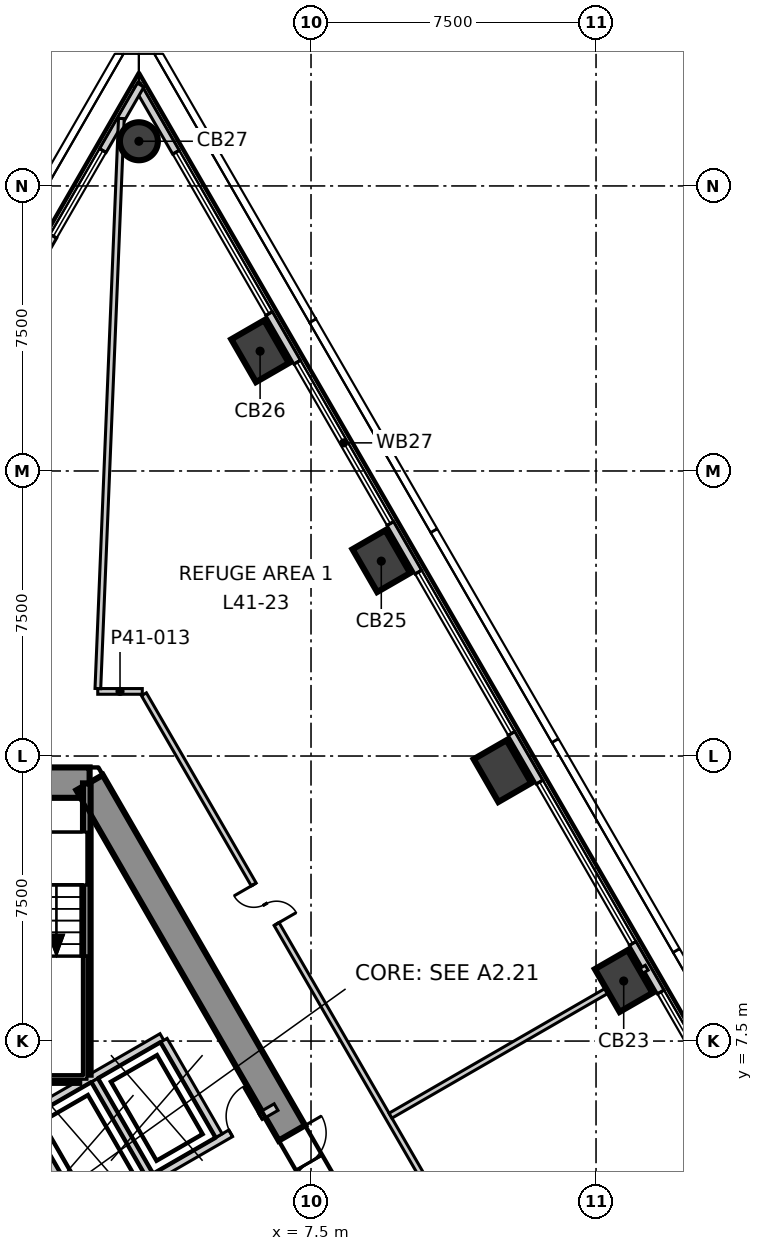
"""IFC4 building model, lengths in metres.
Left out: names, types, materials, properties, quantities, classifications, styles, units other than length and angle.
Written with IfcOpenShell. Run it as: python <this file> out.ifc"""

import sys

from ifc_helpers import new_model, si_unit, direction, frame, frame_2d, origin, origin_2d, place, context, subcontext, project, spatial, polyline, rectangle, circle, outline, extrude, element, fill, save


model = new_model("IFC4")
c1 = context("Model", 3, precision=1e-05, world=origin(), true_north=direction((0.0, 1.0)))
c2 = subcontext(c1, "Body", "Model", "MODEL_VIEW")
j1 = project(units=[si_unit("LENGTHUNIT", "METRE"), si_unit("PLANEANGLEUNIT", "RADIAN")], contexts=[c1])
p1 = place(None, origin())
s1 = spatial("IfcSite", under=j1, at=p1, CompositionType="ELEMENT")
p2 = place(p1, origin())
s2 = spatial("IfcBuilding", under=s1, at=p2, CompositionType="ELEMENT")
p3 = place(p2, frame((0.0, 0.0, 176.3)))
s3 = spatial("IfcBuildingStorey", under=s2, at=p3, CompositionType="ELEMENT", Elevation=176.3)
p4 = place(p3, frame((1.674, 14.3, -0.3), z_axis=(0.0, 0.0, 1.0), x_axis=(-1.0, 0.0, 0.0)))
e1 = element("IfcWall", 1, at=p4, inside=s3, PredefinedType="SHEAR", context=c2, shape_type="SweptSolid", body=[
    extrude(outline(polyline([(-0.231, -0.4), (1.674, -0.4), (3.579, -0.4), (3.117, 0.4), (1.674, 0.4), (0.231, 0.4), (-0.231, -0.4)])), origin(), (0.0, 0.0, 1.0), 4.2),
])
p5 = place(p4, frame((1.437, 0.0, 0.3)))
e2 = element("IfcOpeningElement", 2, at=p5, cuts=e1, PredefinedType="OPENING", context=c2, shape_type="SweptSolid", body=[
    extrude(rectangle(XDim=1.4, YDim=2.1, at=frame_2d((0.7, 1.05))), frame((0.0, 0.41, 0.0), z_axis=(0.0, -1.0, 0.0), x_axis=(1.0, 0.0, 0.0)), (0.0, 0.0, 1.0), 0.82),
])
p6 = place(p3, frame((13.221, -5.7, -0.3), z_axis=(0.0, 0.0, 1.0), x_axis=(-0.499995765644, 0.866027848477, 0.0)))
e3 = element("IfcWall", 3, at=p6, inside=s3, PredefinedType="SHEAR", context=c2, shape_type="SweptSolid", body=[
    extrude(outline(polyline([(-0.231, -0.4), (1.732, -0.4), (3.695, -0.4), (5.658, -0.4), (7.621, -0.4), (9.584, -0.4), (11.547, -0.4), (13.51, -0.4), (15.473, -0.4), (17.436, -0.4), (19.399, -0.4), (21.362, -0.4), (23.325, -0.4), (22.863, 0.4), (20.977, 0.4), (19.091, 0.4), (17.205, 0.4), (15.319, 0.4), (13.433, 0.4), (11.547, 0.4), (9.661, 0.4), (7.775, 0.4), (5.889, 0.4), (4.003, 0.4), (2.117, 0.4), (0.231, 0.4), (-0.231, -0.4)])), origin(), (0.0, 0.0, 1.0), 4.2),
])
p7 = place(p6, frame((10.647, 0.0, 0.3)))
e4 = element("IfcOpeningElement", 4, at=p7, cuts=e3, PredefinedType="OPENING", context=c2, shape_type="SweptSolid", body=[
    extrude(rectangle(XDim=1.8, YDim=2.1, at=frame_2d((0.9, 1.05))), frame((0.0, 0.41, 0.0), z_axis=(0.0, -1.0, 0.0), x_axis=(1.0, 0.0, 0.0)), (0.0, 0.0, 1.0), 0.82),
])
for number, where, z_axis, x_axis in (
    (5, (15.728, 9.08, -0.3), (0.0, 0.0, 1.0), (-0.5, 0.866, 0.0)),
    (6, (12.538, 14.604, -0.3), (0.0, 0.0, 1.0), (-0.5, 0.866, 0.0)),
    (7, (9.349, 20.128, -0.3), (0.0, 0.0, 1.0), (-0.5, 0.866, 0.0)),
    (8, (6.16, 25.652, -0.3), (0.0, 0.0, 1.0), (-0.5, 0.866, 0.0)),
):
    element("IfcColumn", number, at=place(p3, frame(where, z_axis=z_axis, x_axis=x_axis)), inside=s3, PredefinedType="COLUMN", context=c2, shape_type="SweptSolid", body=[
        extrude(rectangle(XDim=1.3, YDim=1.0, at=origin_2d()), origin(), (0.0, 0.0, 1.0), 4.2),
    ])
p8 = place(p3, frame((2.971, 31.176, -0.3), z_axis=(0.0, 0.0, 1.0), x_axis=(-0.5, 0.866025403784, 0.0)))
e9 = element("IfcColumn", 9, at=p8, inside=s3, PredefinedType="COLUMN", context=c2, shape_type="SweptSolid", body=[
    extrude(circle(Radius=0.5, at=origin_2d()), origin(), (0.0, 0.0, 1.0), 4.2),
])
p9 = place(p3, frame((29.742, -13.793, 0.0), z_axis=(0.0, 0.0, 1.0), x_axis=(-0.499994049952, 0.866028839019, 0.0)))
e10 = element("IfcWall", 10, at=p9, inside=s3, PredefinedType="ELEMENTEDWALL", context=c2, shape_type="SweptSolid", body=[
    extrude(rectangle(XDim=53.613, YDim=0.2, at=frame_2d((26.806, 0.0))), origin(), (0.0, 0.0, 1.0), 3.9),
])
p10 = place(p9, frame((2.042, 0.0, 0.9)))
e11 = element("IfcOpeningElement", 11, at=p10, cuts=e10, PredefinedType="OPENING", context=c2, shape_type="SweptSolid", body=[
    extrude(rectangle(XDim=4.9, YDim=2.5, at=frame_2d((2.45, 1.25))), frame((0.0, 0.11, 0.0), z_axis=(0.0, -1.0, 0.0), x_axis=(1.0, 0.0, 0.0)), (0.0, 0.0, 1.0), 0.22),
])
p11 = place(p9, frame((8.42, 0.0, 0.9)))
e12 = element("IfcOpeningElement", 12, at=p11, cuts=e10, PredefinedType="OPENING", context=c2, shape_type="SweptSolid", body=[
    extrude(rectangle(XDim=4.9, YDim=2.5, at=frame_2d((2.45, 1.25))), frame((0.0, 0.11, 0.0), z_axis=(0.0, -1.0, 0.0), x_axis=(1.0, 0.0, 0.0)), (0.0, 0.0, 1.0), 0.22),
])
p12 = place(p9, frame((14.799, 0.0, 0.9)))
e13 = element("IfcOpeningElement", 13, at=p12, cuts=e10, PredefinedType="OPENING", context=c2, shape_type="SweptSolid", body=[
    extrude(rectangle(XDim=4.9, YDim=2.5, at=frame_2d((2.45, 1.25))), frame((0.0, 0.11, 0.0), z_axis=(0.0, -1.0, 0.0), x_axis=(1.0, 0.0, 0.0)), (0.0, 0.0, 1.0), 0.22),
])
p13 = place(p9, frame((21.177, 0.0, 0.9)))
e14 = element("IfcOpeningElement", 14, at=p13, cuts=e10, PredefinedType="OPENING", context=c2, shape_type="SweptSolid", body=[
    extrude(rectangle(XDim=4.9, YDim=2.5, at=frame_2d((2.45, 1.25))), frame((0.0, 0.11, 0.0), z_axis=(0.0, -1.0, 0.0), x_axis=(1.0, 0.0, 0.0)), (0.0, 0.0, 1.0), 0.22),
])
p14 = place(p9, frame((27.555, 0.0, 0.9)))
e15 = element("IfcOpeningElement", 15, at=p14, cuts=e10, PredefinedType="OPENING", context=c2, shape_type="SweptSolid", body=[
    extrude(rectangle(XDim=4.9, YDim=2.5, at=frame_2d((2.45, 1.25))), frame((0.0, 0.11, 0.0), z_axis=(0.0, -1.0, 0.0), x_axis=(1.0, 0.0, 0.0)), (0.0, 0.0, 1.0), 0.22),
])
p15 = place(p9, frame((33.934, 0.0, 0.9)))
e16 = element("IfcOpeningElement", 16, at=p15, cuts=e10, PredefinedType="OPENING", context=c2, shape_type="SweptSolid", body=[
    extrude(rectangle(XDim=4.9, YDim=2.5, at=frame_2d((2.45, 1.25))), frame((0.0, 0.11, 0.0), z_axis=(0.0, -1.0, 0.0), x_axis=(1.0, 0.0, 0.0)), (0.0, 0.0, 1.0), 0.22),
])
p16 = place(p9, frame((40.312, 0.0, 0.9)))
e17 = element("IfcOpeningElement", 17, at=p16, cuts=e10, PredefinedType="OPENING", context=c2, shape_type="SweptSolid", body=[
    extrude(rectangle(XDim=4.9, YDim=2.5, at=frame_2d((2.45, 1.25))), frame((0.0, 0.11, 0.0), z_axis=(0.0, -1.0, 0.0), x_axis=(1.0, 0.0, 0.0)), (0.0, 0.0, 1.0), 0.22),
])
p17 = place(p9, frame((46.691, 0.0, 0.9)))
e18 = element("IfcOpeningElement", 18, at=p17, cuts=e10, PredefinedType="OPENING", context=c2, shape_type="SweptSolid", body=[
    extrude(rectangle(XDim=4.9, YDim=2.5, at=frame_2d((2.45, 1.25))), frame((0.0, 0.11, 0.0), z_axis=(0.0, -1.0, 0.0), x_axis=(1.0, 0.0, 0.0)), (0.0, 0.0, 1.0), 0.22),
])
p18 = place(p3, frame((3.016, 32.654, 0.0), z_axis=(0.0, 0.0, 1.0), x_axis=(-0.499886353396, -0.86609100774, 0.0)))
e19 = element("IfcWall", 19, at=p18, inside=s3, PredefinedType="ELEMENTEDWALL", context=c2, shape_type="SweptSolid", body=[
    extrude(rectangle(XDim=6.104, YDim=0.2, at=frame_2d((3.052, 0.0))), origin(), (0.0, 0.0, 1.0), 3.9),
])
p19 = place(p18, frame((1.99, 0.0, 0.9)))
e20 = element("IfcOpeningElement", 20, at=p19, cuts=e19, PredefinedType="OPENING", context=c2, shape_type="SweptSolid", body=[
    extrude(rectangle(XDim=2.6, YDim=2.5, at=frame_2d((1.3, 1.25))), frame((0.0, 0.11, 0.0), z_axis=(0.0, -1.0, 0.0), x_axis=(1.0, 0.0, 0.0)), (0.0, 0.0, 1.0), 0.22),
])
p20 = place(p3, frame((1.888, 16.7, 0.0), z_axis=(0.0, 0.0, 1.0), x_axis=(1.0, 0.0, 0.0)))
e21 = element("IfcWall", 21, at=p20, inside=s3, PredefinedType="PARTITIONING", context=c2, shape_type="SweptSolid", body=[
    extrude(rectangle(XDim=1.172, YDim=0.15, at=frame_2d((0.586, 0.0))), origin(), (0.0, 0.0, 1.0), 3.9),
])
p21 = place(p3, frame((3.103, 16.625, 0.0), z_axis=(0.0, 0.0, 1.0), x_axis=(0.500016758057, -0.866015728299, 0.0)))
e22 = element("IfcWall", 22, at=p21, inside=s3, PredefinedType="PARTITIONING", context=c2, shape_type="SweptSolid", body=[
    extrude(rectangle(XDim=25.779, YDim=0.15, at=frame_2d((12.889, 0.0))), origin(), (0.0, 0.0, 1.0), 3.9),
])
p22 = place(p21, frame((18.712, 0.0, 0.0)))
e23 = element("IfcOpeningElement", 23, at=p22, cuts=e22, PredefinedType="OPENING", context=c2, shape_type="SweptSolid", body=[
    extrude(rectangle(XDim=1.2, YDim=2.1, at=frame_2d((0.6, 1.05))), frame((0.0, 0.085, 0.0), z_axis=(0.0, -1.0, 0.0), x_axis=(1.0, 0.0, 0.0)), (0.0, 0.0, 1.0), 0.17),
])
p23 = place(p21, frame((5.78, 0.0, 0.0)))
e24 = element("IfcOpeningElement", 24, at=p23, cuts=e22, PredefinedType="OPENING", context=c2, shape_type="SweptSolid", body=[
    extrude(rectangle(XDim=1.2, YDim=2.1, at=frame_2d((0.6, 1.05))), frame((0.0, 0.085, 0.0), z_axis=(0.0, -1.0, 0.0), x_axis=(1.0, 0.0, 0.0)), (0.0, 0.0, 1.0), 0.17),
])
p24 = place(p3, frame((1.891, 16.775, 0.0), z_axis=(0.0, 0.0, 1.0), x_axis=(0.04115975221, 0.999152578337, 0.0)))
e25 = element("IfcWall", 25, at=p24, inside=s3, PredefinedType="PARTITIONING", context=c2, shape_type="SweptSolid", body=[
    extrude(rectangle(XDim=15.013, YDim=0.15, at=frame_2d((7.506, 0.0))), origin(), (0.0, 0.0, 1.0), 3.2),
])
p25 = place(p3, frame((9.591, 5.537, 0.0), z_axis=(0.0, 0.0, 1.0), x_axis=(0.86603676932, 0.499980313799, 0.0)))
e26 = element("IfcWall", 26, at=p25, inside=s3, PredefinedType="PARTITIONING", context=c2, shape_type="SweptSolid", body=[
    extrude(rectangle(XDim=7.786, YDim=0.15, at=frame_2d((3.893, 0.0))), origin(), (0.0, 0.0, 1.0), 3.4),
])
p26 = place(p3, frame((-0.002, 5.542, 0.0), z_axis=(0.0, 0.0, 1.0), x_axis=(0.866103910842, 0.499863997127, 0.0)))
e27 = element("IfcWall", 27, at=p26, inside=s3, PredefinedType="SOLIDWALL", context=c2, shape_type="SweptSolid", body=[
    extrude(rectangle(XDim=4.131, YDim=0.2, at=frame_2d((2.065, 0.0))), origin(), (0.0, 0.0, 1.0), 3.9),
])
p27 = place(p3, frame((0.0, 5.4, 0.0), z_axis=(0.0, 0.0, 1.0), x_axis=(0.500103862429, -0.865965430478, 0.0)))
e28 = element("IfcWall", 28, at=p27, inside=s3, PredefinedType="SOLIDWALL", context=c2, shape_type="SweptSolid", body=[
    extrude(rectangle(XDim=2.973, YDim=0.2, at=frame_2d((1.487, 0.0))), origin(), (0.0, 0.0, 1.0), 3.9),
])
p28 = place(p3, frame((1.577, 2.874, 0.0), z_axis=(0.0, 0.0, 1.0), x_axis=(0.866073694534, 0.499916348638, 0.0)))
e29 = element("IfcWall", 29, at=p28, inside=s3, PredefinedType="SOLIDWALL", context=c2, shape_type="SweptSolid", body=[
    extrude(rectangle(XDim=5.777, YDim=0.2, at=frame_2d((2.888, 0.0))), origin(), (0.0, 0.0, 1.0), 3.9),
])
p29 = place(p28, frame((4.399, 0.0, 0.0)))
e30 = element("IfcOpeningElement", 30, at=p29, cuts=e29, PredefinedType="OPENING", context=c2, shape_type="SweptSolid", body=[
    extrude(rectangle(XDim=0.9, YDim=2.1, at=frame_2d((0.45, 1.05))), frame((0.0, 0.11, 0.0), z_axis=(0.0, -1.0, 0.0), x_axis=(1.0, 0.0, 0.0)), (0.0, 0.0, 1.0), 0.22),
])
for number, where, z_axis, x_axis in (
    (31, (3.626, 7.52, 0.0), (0.0, 0.0, 1.0), (0.5, -0.866, 0.0)),
    (32, (1.807, 6.47, 0.0), (0.0, 0.0, 1.0), (0.5, -0.866, 0.0)),
):
    element("IfcWall", number, at=place(p3, frame(where, z_axis=z_axis, x_axis=x_axis)), inside=s3, PredefinedType="SOLIDWALL", context=c2, shape_type="SweptSolid", body=[
        extrude(rectangle(XDim=2.9, YDim=0.2, at=frame_2d((1.45, 0.0))), origin(), (0.0, 0.0, 1.0), 3.9),
    ])
p30 = place(p3, frame((1.6, 6.615, 0.0), z_axis=(0.0, 0.0, 1.0), x_axis=(0.0, 1.0, 0.0)))
e33 = element("IfcWall", 33, at=p30, inside=s3, PredefinedType="SOLIDWALL", context=c2, shape_type="SweptSolid", body=[
    extrude(rectangle(XDim=7.665, YDim=0.2, at=frame_2d((3.833, 0.0))), origin(), (0.0, 0.0, 1.0), 3.9),
])
p31 = place(p3, frame((-1.4, 6.5, 0.0), z_axis=(0.0, 0.0, 1.0), x_axis=(1.0, 0.0, 0.0)))
e34 = element("IfcWall", 34, at=p31, inside=s3, PredefinedType="SOLIDWALL", context=c2, shape_type="SweptSolid", body=[
    extrude(rectangle(XDim=2.8, YDim=0.2, at=frame_2d((1.4, 0.0))), origin(), (0.0, 0.0, 1.0), 3.9),
])
p32 = place(p13, origin())
e35 = element("IfcWindow", 35, at=p32, inside=s3, PartitioningType="SINGLE_PANEL", PredefinedType="WINDOW", context=c2, shape_type="SweptSolid", body=[
    extrude(rectangle(XDim=4.9, YDim=2.5, at=frame_2d((2.45, 1.25))), frame((0.0, 0.03, 0.0), z_axis=(0.0, -1.0, 0.0), x_axis=(1.0, 0.0, 0.0)), (0.0, 0.0, 1.0), 0.06),
])
fill(e14, e35)
p33 = place(p14, origin())
e36 = element("IfcWindow", 36, at=p33, inside=s3, PartitioningType="SINGLE_PANEL", PredefinedType="WINDOW", context=c2, shape_type="SweptSolid", body=[
    extrude(rectangle(XDim=4.9, YDim=2.5, at=frame_2d((2.45, 1.25))), frame((0.0, 0.03, 0.0), z_axis=(0.0, -1.0, 0.0), x_axis=(1.0, 0.0, 0.0)), (0.0, 0.0, 1.0), 0.06),
])
fill(e15, e36)
p34 = place(p15, origin())
e37 = element("IfcWindow", 37, at=p34, inside=s3, PartitioningType="SINGLE_PANEL", PredefinedType="WINDOW", context=c2, shape_type="SweptSolid", body=[
    extrude(rectangle(XDim=4.9, YDim=2.5, at=frame_2d((2.45, 1.25))), frame((0.0, 0.03, 0.0), z_axis=(0.0, -1.0, 0.0), x_axis=(1.0, 0.0, 0.0)), (0.0, 0.0, 1.0), 0.06),
])
fill(e16, e37)
p35 = place(p16, origin())
e38 = element("IfcWindow", 38, at=p35, inside=s3, PartitioningType="SINGLE_PANEL", PredefinedType="WINDOW", context=c2, shape_type="SweptSolid", body=[
    extrude(rectangle(XDim=4.9, YDim=2.5, at=frame_2d((2.45, 1.25))), frame((0.0, 0.03, 0.0), z_axis=(0.0, -1.0, 0.0), x_axis=(1.0, 0.0, 0.0)), (0.0, 0.0, 1.0), 0.06),
])
fill(e17, e38)
p36 = place(p17, origin())
e39 = element("IfcWindow", 39, at=p36, inside=s3, PartitioningType="SINGLE_PANEL", PredefinedType="WINDOW", context=c2, shape_type="SweptSolid", body=[
    extrude(rectangle(XDim=4.9, YDim=2.5, at=frame_2d((2.45, 1.25))), frame((0.0, 0.03, 0.0), z_axis=(0.0, -1.0, 0.0), x_axis=(1.0, 0.0, 0.0)), (0.0, 0.0, 1.0), 0.06),
])
fill(e18, e39)
p37 = place(p19, origin())
e40 = element("IfcWindow", 40, at=p37, inside=s3, PartitioningType="SINGLE_PANEL", PredefinedType="WINDOW", context=c2, shape_type="SweptSolid", body=[
    extrude(rectangle(XDim=2.6, YDim=2.5, at=frame_2d((1.3, 1.25))), frame((0.0, 0.03, 0.0), z_axis=(0.0, -1.0, 0.0), x_axis=(1.0, 0.0, 0.0)), (0.0, 0.0, 1.0), 0.06),
])
fill(e20, e40)
p38 = place(p23, origin())
e41 = element("IfcDoor", 41, at=p38, inside=s3, OperationType="DOUBLE_DOOR_SINGLE_SWING", PredefinedType="DOOR", context=c2, shape_type="SweptSolid", body=[
    extrude(rectangle(XDim=1.2, YDim=2.1, at=frame_2d((0.6, 1.05))), frame((0.0, 0.025, 0.0), z_axis=(0.0, -1.0, 0.0), x_axis=(1.0, 0.0, 0.0)), (0.0, 0.0, 1.0), 0.05),
])
fill(e24, e41)
p39 = place(p7, origin())
e42 = element("IfcDoor", 42, at=p39, inside=s3, OperationType="DOUBLE_DOOR_SINGLE_SWING", PredefinedType="DOOR", context=c2, shape_type="SweptSolid", body=[
    extrude(rectangle(XDim=1.8, YDim=2.1, at=frame_2d((0.9, 1.05))), frame((0.0, 0.025, 0.0), z_axis=(0.0, -1.0, 0.0), x_axis=(1.0, 0.0, 0.0)), (0.0, 0.0, 1.0), 0.05),
])
fill(e4, e42)
p40 = place(p29, origin())
e43 = element("IfcDoor", 43, at=p40, inside=s3, OperationType="SINGLE_SWING_LEFT", PredefinedType="DOOR", context=c2, shape_type="SweptSolid", body=[
    extrude(rectangle(XDim=0.9, YDim=2.1, at=frame_2d((0.45, 1.05))), frame((0.0, 0.025, 0.0), z_axis=(0.0, -1.0, 0.0), x_axis=(1.0, 0.0, 0.0)), (0.0, 0.0, 1.0), 0.05),
])
fill(e30, e43)
save(model, sys.argv[1])
